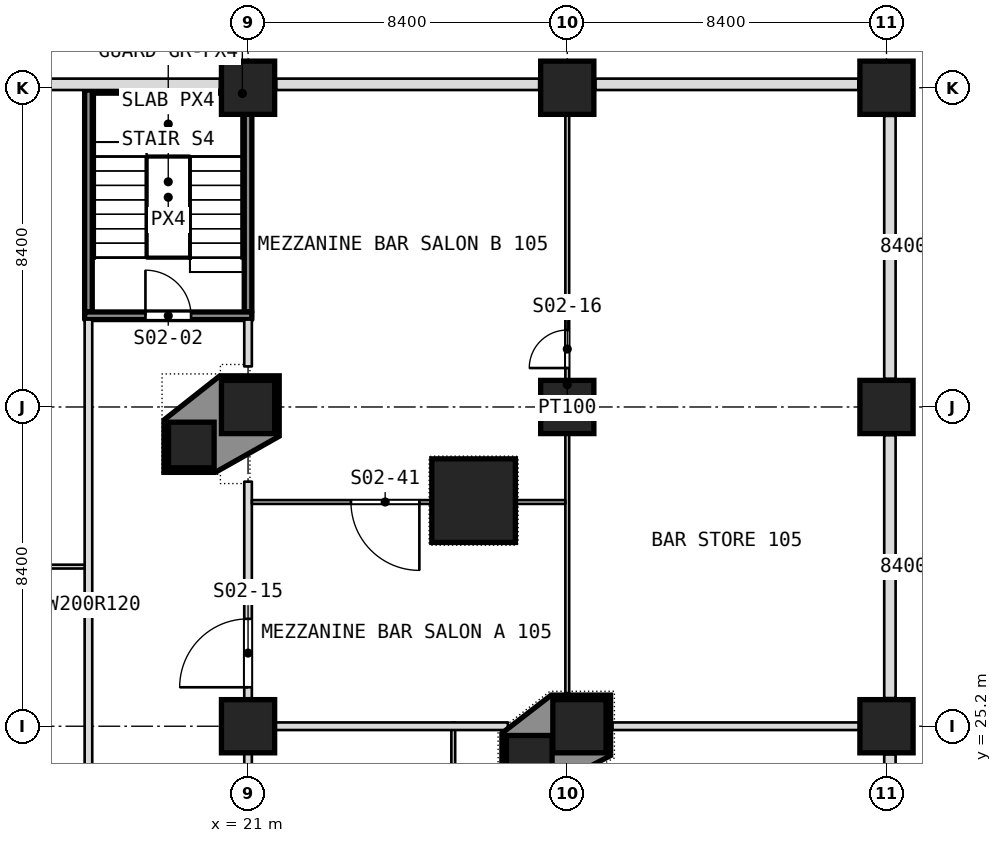
"""IFC4 building model, lengths in metres.
Left out: names, types, materials, properties, quantities, classifications, styles, units other than length and angle.
Written with IfcOpenShell. Run it as: python <this file> out.ifc"""

import sys

from ifc_helpers import new_model, si_unit, direction, frame, frame_2d, origin, origin_2d, place, context, subcontext, project, spatial, polyline, rectangle, outline, extrude, element, fill, save


model = new_model("IFC4")
c1 = context("Model", 3, precision=1e-05, world=origin(), true_north=direction((0.0, 1.0)))
c2 = subcontext(c1, "Body", "Model", "MODEL_VIEW")
j1 = project(units=[si_unit("LENGTHUNIT", "METRE"), si_unit("PLANEANGLEUNIT", "RADIAN")], contexts=[c1])
p1 = place(None, origin())
s1 = spatial("IfcSite", under=j1, at=p1, CompositionType="ELEMENT")
p2 = place(p1, origin())
s2 = spatial("IfcBuilding", under=s1, at=p2, CompositionType="ELEMENT")
p3 = place(p2, frame((0.0, 0.0, 8.0)))
s3 = spatial("IfcBuildingStorey", under=s2, at=p3, CompositionType="ELEMENT", Elevation=8.0)
for number, where, z_axis, x_axis in (
    (1, (21.0, 25.2, 0.0), (0.0, 0.0, 1.0), (1.0, 0.0, 0.0)),
    (2, (29.72, 25.2, 0.0), (0.0, 0.0, 1.0), (1.0, 0.0, 0.0)),
    (3, (37.8, 25.2, 0.0), (0.0, 0.0, 1.0), (1.0, 0.0, 0.0)),
    (4, (21.0, 33.6, 0.0), (0.0, 0.0, 1.0), (1.0, 0.0, 0.0)),
    (5, (29.4, 33.6, 0.0), (0.0, 0.0, 1.0), (1.0, 0.0, 0.0)),
    (6, (37.8, 33.6, 0.0), (0.0, 0.0, 1.0), (1.0, 0.0, 0.0)),
    (7, (21.0, 42.0, 0.0), (0.0, 0.0, 1.0), (1.0, 0.0, 0.0)),
    (8, (29.4, 42.0, 0.0), (0.0, 0.0, 1.0), (1.0, 0.0, 0.0)),
    (9, (37.8, 42.0, 0.0), (0.0, 0.0, 1.0), (1.0, 0.0, 0.0)),
):
    element("IfcColumn", number, at=place(p3, frame(where, z_axis=z_axis, x_axis=x_axis)), inside=s3, PredefinedType="COLUMN", context=c2, shape_type="SweptSolid", body=[
        extrude(rectangle(XDim=1.4, YDim=1.4, at=origin_2d()), origin(), (0.0, 0.0, 1.0), 5.0),
    ])
p4 = place(p3, frame((26.936, 31.135, 0.0), z_axis=(0.0, 0.0, 1.0), x_axis=(1.0, 0.0, 0.0)))
e10 = element("IfcColumn", 10, at=p4, inside=s3, PredefinedType="COLUMN", context=c2, shape_type="SweptSolid", body=[
    extrude(rectangle(XDim=2.2, YDim=2.2, at=origin_2d()), origin(), (0.0, 0.0, 1.0), 5.0),
])
for number, where, z_axis, x_axis in (
    (11, (19.507, 32.6, 0.0), (0.0, 0.0, 1.0), (1.0, 0.0, 0.0)),
    (12, (28.4, 24.356, 0.0), (0.0, 0.0, 1.0), (1.0, 0.0, 0.0)),
):
    element("IfcColumn", number, at=place(p3, frame(where, z_axis=z_axis, x_axis=x_axis)), inside=s3, PredefinedType="COLUMN", context=c2, shape_type="SweptSolid", body=[
        extrude(rectangle(XDim=1.2, YDim=1.2, at=origin_2d()), origin(), (0.0, 0.0, 1.0), 5.0),
    ])
p5 = place(p3, frame((29.4, 26.07, 0.0), z_axis=(0.0, 0.0, 1.0), x_axis=(0.0, 1.0, 0.0)))
e13 = element("IfcWall", 13, at=p5, inside=s3, PredefinedType="PARTITIONING", context=c2, shape_type="SweptSolid", body=[
    extrude(rectangle(XDim=16.23, YDim=0.1, at=frame_2d((8.115, 0.0))), origin(), (0.0, 0.0, 1.0), 4.68),
])
p6 = place(p5, frame((8.555, 0.0, 0.0)))
e14 = element("IfcOpeningElement", 14, at=p6, cuts=e13, PredefinedType="OPENING", context=c2, shape_type="SweptSolid", body=[
    extrude(rectangle(XDim=1.0, YDim=2.1, at=frame_2d((0.5, 1.05))), frame((0.0, 0.05, 0.0), z_axis=(0.0, -1.0, 0.0), x_axis=(1.0, 0.0, 0.0)), (0.0, 0.0, 1.0), 0.1),
])
p7 = place(p3, frame((26.4, 16.9, 0.0), z_axis=(0.0, 0.0, 1.0), x_axis=(0.0, 1.0, 0.0)))
e15 = element("IfcWall", 15, at=p7, inside=s3, PredefinedType="PARTITIONING", context=c2, shape_type="SweptSolid", body=[
    extrude(rectangle(XDim=8.4, YDim=0.1, at=frame_2d((4.2, 0.0))), origin(), (0.0, 0.0, 1.0), 4.68),
])
p8 = place(p7, frame((3.7, 0.0, 0.0)))
e16 = element("IfcOpeningElement", 16, at=p8, cuts=e15, PredefinedType="OPENING", context=c2, shape_type="SweptSolid", body=[
    extrude(rectangle(XDim=1.0, YDim=2.1, at=frame_2d((0.5, 1.05))), frame((0.0, 0.05, 0.0), z_axis=(0.0, -1.0, 0.0), x_axis=(1.0, 0.0, 0.0)), (0.0, 0.0, 1.0), 0.1),
])
p9 = place(p3, frame((21.0, 9.5, 0.0), z_axis=(0.0, 0.0, 1.0), x_axis=(0.0, 1.0, 0.0)))
e17 = element("IfcWall", 17, at=p9, inside=s3, PredefinedType="PARTITIONING", context=c2, shape_type="SweptSolid", body=[
    extrude(rectangle(XDim=22.135, YDim=0.2, at=frame_2d((11.067, 0.0))), origin(), (0.0, 0.0, 1.0), 4.68),
])
p10 = place(p9, frame((9.9, 0.0, 0.0)))
e18 = element("IfcOpeningElement", 18, at=p10, cuts=e17, PredefinedType="OPENING", context=c2, shape_type="SweptSolid", body=[
    extrude(rectangle(XDim=1.0, YDim=2.1, at=frame_2d((0.5, 1.05))), frame((0.0, 0.1, 0.0), z_axis=(0.0, -1.0, 0.0), x_axis=(1.0, 0.0, 0.0)), (0.0, 0.0, 1.0), 0.2),
])
p11 = place(p9, frame((16.725, 0.0, 0.0)))
e19 = element("IfcOpeningElement", 19, at=p11, cuts=e17, PredefinedType="OPENING", context=c2, shape_type="SweptSolid", body=[
    extrude(rectangle(XDim=1.8, YDim=2.1, at=frame_2d((0.9, 1.05))), frame((0.0, 0.1, 0.0), z_axis=(0.0, -1.0, 0.0), x_axis=(1.0, 0.0, 0.0)), (0.0, 0.0, 1.0), 0.2),
])
p12 = place(p3, frame((21.0, 34.668, 0.0), z_axis=(0.0, 0.0, 1.0), x_axis=(0.0, 1.0, 0.0)))
e20 = element("IfcWall", 20, at=p12, inside=s3, PredefinedType="PARTITIONING", context=c2, shape_type="SweptSolid", body=[
    extrude(rectangle(XDim=1.232, YDim=0.2, at=frame_2d((0.616, 0.0))), origin(), (0.0, 0.0, 1.0), 4.68),
])
p13 = place(p3, frame((21.0, 36.1, 0.0), z_axis=(0.0, 0.0, 1.0), x_axis=(0.0, 1.0, 0.0)))
e21 = element("IfcWall", 21, at=p13, inside=s3, PredefinedType="PARTITIONING", context=c2, shape_type="SweptSolid", body=[
    extrude(rectangle(XDim=6.2, YDim=0.2, at=frame_2d((3.1, 0.0))), origin(), (0.0, 0.0, 1.0), 4.68),
])
p14 = place(p3, frame((16.8, 20.9, 0.0), z_axis=(0.0, 0.0, 1.0), x_axis=(0.0, 1.0, 0.0)))
e22 = element("IfcWall", 22, at=p14, inside=s3, PredefinedType="PARTITIONING", context=c2, shape_type="SweptSolid", body=[
    extrude(rectangle(XDim=15.0, YDim=0.2, at=frame_2d((7.5, 0.0))), origin(), (0.0, 0.0, 1.0), 4.68),
])
p15 = place(p3, frame((16.8, 36.1, 0.0), z_axis=(0.0, 0.0, 1.0), x_axis=(0.0, 1.0, 0.0)))
e23 = element("IfcWall", 23, at=p15, inside=s3, PredefinedType="PARTITIONING", context=c2, shape_type="SweptSolid", body=[
    extrude(rectangle(XDim=5.84, YDim=0.2, at=frame_2d((2.92, 0.0))), origin(), (0.0, 0.0, 1.0), 4.68),
])
p16 = place(p3, frame((21.1, 25.2, 0.0), z_axis=(0.0, 0.0, 1.0), x_axis=(1.0, 0.0, 0.0)))
e24 = element("IfcWall", 24, at=p16, inside=s3, PredefinedType="PARTITIONING", context=c2, shape_type="SweptSolid", body=[
    extrude(rectangle(XDim=6.737, YDim=0.2, at=frame_2d((3.368, 0.0))), origin(), (0.0, 0.0, 1.0), 4.68),
])
p17 = place(p3, frame((30.59, 25.2, 0.0), z_axis=(0.0, 0.0, 1.0), x_axis=(1.0, 0.0, 0.0)))
e25 = element("IfcWall", 25, at=p17, inside=s3, PredefinedType="PARTITIONING", context=c2, shape_type="SweptSolid", body=[
    extrude(rectangle(XDim=7.51, YDim=0.2, at=frame_2d((3.755, 0.0))), origin(), (0.0, 0.0, 1.0), 4.68),
])
p18 = place(p3, frame((4.3, 29.4, 0.0), z_axis=(0.0, 0.0, 1.0), x_axis=(1.0, 0.0, 0.0)))
e26 = element("IfcWall", 26, at=p18, inside=s3, PredefinedType="PARTITIONING", context=c2, shape_type="SweptSolid", body=[
    extrude(rectangle(XDim=12.4, YDim=0.1, at=frame_2d((6.2, 0.0))), origin(), (0.0, 0.0, 1.0), 4.68),
])
p19 = place(p18, frame((5.6, 0.0, 0.0)))
e27 = element("IfcOpeningElement", 27, at=p19, cuts=e26, PredefinedType="OPENING", context=c2, shape_type="SweptSolid", body=[
    extrude(rectangle(XDim=1.2, YDim=2.1, at=frame_2d((0.6, 1.05))), frame((0.0, 0.05, 0.0), z_axis=(0.0, -1.0, 0.0), x_axis=(1.0, 0.0, 0.0)), (0.0, 0.0, 1.0), 0.1),
])
p20 = place(p3, frame((21.1, 31.1, 0.0), z_axis=(0.0, 0.0, 1.0), x_axis=(1.0, 0.0, 0.0)))
e28 = element("IfcWall", 28, at=p20, inside=s3, PredefinedType="PARTITIONING", context=c2, shape_type="SweptSolid", body=[
    extrude(rectangle(XDim=4.716, YDim=0.1, at=frame_2d((2.358, 0.0))), origin(), (0.0, 0.0, 1.0), 4.68),
])
p21 = place(p20, frame((2.608, 0.0, 0.0)))
e29 = element("IfcOpeningElement", 29, at=p21, cuts=e28, PredefinedType="OPENING", context=c2, shape_type="SweptSolid", body=[
    extrude(rectangle(XDim=1.8, YDim=2.1, at=frame_2d((0.9, 1.05))), frame((0.0, 0.05, 0.0), z_axis=(0.0, -1.0, 0.0), x_axis=(1.0, 0.0, 0.0)), (0.0, 0.0, 1.0), 0.1),
])
p22 = place(p3, frame((28.056, 31.1, 0.0), z_axis=(0.0, 0.0, 1.0), x_axis=(1.0, 0.0, 0.0)))
e30 = element("IfcWall", 30, at=p22, inside=s3, PredefinedType="PARTITIONING", context=c2, shape_type="SweptSolid", body=[
    extrude(rectangle(XDim=1.294, YDim=0.1, at=frame_2d((0.647, 0.0))), origin(), (0.0, 0.0, 1.0), 4.68),
])
p23 = place(p3, frame((16.7, 36.0, 0.0), z_axis=(0.0, 0.0, 1.0), x_axis=(1.0, 0.0, 0.0)))
e31 = element("IfcWall", 31, at=p23, inside=s3, PredefinedType="PARTITIONING", context=c2, shape_type="SweptSolid", body=[
    extrude(rectangle(XDim=4.4, YDim=0.2, at=frame_2d((2.2, 0.0))), origin(), (0.0, 0.0, 1.0), 4.68),
])
p24 = place(p23, frame((1.6, 0.0, 0.0)))
e32 = element("IfcOpeningElement", 32, at=p24, cuts=e31, PredefinedType="OPENING", context=c2, shape_type="SweptSolid", body=[
    extrude(rectangle(XDim=1.2, YDim=2.1, at=frame_2d((0.6, 1.05))), frame((0.0, 0.1, 0.0), z_axis=(0.0, -1.0, 0.0), x_axis=(1.0, 0.0, 0.0)), (0.0, 0.0, 1.0), 0.2),
])
p25 = place(p3, frame((37.89, 17.54, 0.0), z_axis=(0.0, 0.0, 1.0), x_axis=(0.0, 1.0, 0.0)))
e33 = element("IfcWall", 33, at=p25, inside=s3, PredefinedType="NOTDEFINED", context=c2, shape_type="SweptSolid", body=[
    extrude(rectangle(XDim=6.92, YDim=0.3, at=frame_2d((3.46, 0.0))), origin(), (0.0, 0.0, 1.0), 3.78),
])
p26 = place(p3, frame((37.89, 25.94, 0.0), z_axis=(0.0, 0.0, 1.0), x_axis=(0.0, 1.0, 0.0)))
e34 = element("IfcWall", 34, at=p26, inside=s3, PredefinedType="NOTDEFINED", context=c2, shape_type="SweptSolid", body=[
    extrude(rectangle(XDim=6.92, YDim=0.3, at=frame_2d((3.46, 0.0))), origin(), (0.0, 0.0, 1.0), 3.78),
])
p27 = place(p3, frame((37.89, 34.34, 0.0), z_axis=(0.0, 0.0, 1.0), x_axis=(0.0, 1.0, 0.0)))
e35 = element("IfcWall", 35, at=p27, inside=s3, PredefinedType="NOTDEFINED", context=c2, shape_type="SweptSolid", body=[
    extrude(rectangle(XDim=6.92, YDim=0.3, at=frame_2d((3.46, 0.0))), origin(), (0.0, 0.0, 1.0), 3.78),
])
p28 = place(p3, frame((37.06, 42.09, 0.0), z_axis=(0.0, 0.0, 1.0), x_axis=(-1.0, 0.0, 0.0)))
e36 = element("IfcWall", 36, at=p28, inside=s3, PredefinedType="NOTDEFINED", context=c2, shape_type="SweptSolid", body=[
    extrude(rectangle(XDim=6.92, YDim=0.3, at=frame_2d((3.46, 0.0))), origin(), (0.0, 0.0, 1.0), 3.78),
])
for number, where, z_axis, x_axis in (
    (37, (28.66, 42.09, 0.0), (0.0, 0.0, 1.0), (-1.0, 0.0, 0.0)),
    (38, (20.26, 42.09, 0.0), (0.0, 0.0, 1.0), (-1.0, 0.0, 0.0)),
):
    element("IfcWall", number, at=place(p3, frame(where, z_axis=z_axis, x_axis=x_axis)), inside=s3, PredefinedType="NOTDEFINED", context=c2, shape_type="SweptSolid", body=[
        extrude(rectangle(XDim=6.92, YDim=0.3, at=frame_2d((3.46, 0.0))), origin(), (0.0, 0.0, 1.0), 3.78),
    ])
p29 = place(p3, origin())
e39 = element("IfcWall", 39, at=p29, inside=s3, PredefinedType="SOLIDWALL", context=c2, shape_type="SweptSolid", body=[
    extrude(outline(polyline([(20.258, 34.42), (21.82, 34.42), (21.82, 32.83), (20.138, 31.88), (18.787, 31.88), (18.787, 33.258), (20.258, 34.42)]), holes=[polyline([(21.7, 32.9), (21.7, 34.3), (20.3, 34.3), (20.3, 32.9), (21.7, 32.9)]), polyline([(20.107, 32.0), (20.107, 33.2), (18.907, 33.2), (18.907, 32.0), (20.107, 32.0)])]), origin(), (0.0, 0.0, 1.0), 5.0),
])
p30 = place(p3, origin())
e40 = element("IfcWall", 40, at=p30, inside=s3, PredefinedType="SOLIDWALL", context=c2, shape_type="SweptSolid", body=[
    extrude(outline(polyline([(27.68, 25.015), (28.979, 26.02), (30.54, 26.02), (30.54, 24.427), (29.03, 23.636), (27.68, 23.636), (27.68, 25.015)]), holes=[polyline([(29.02, 24.5), (30.42, 24.5), (30.42, 25.9), (29.02, 25.9), (29.02, 24.5)]), polyline([(27.8, 23.756), (29.0, 23.756), (29.0, 24.956), (27.8, 24.956), (27.8, 23.756)])]), origin(), (0.0, 0.0, 1.0), 5.0),
])
p31 = place(p6, origin())
e41 = element("IfcDoor", 41, at=p31, inside=s3, OperationType="SINGLE_SWING_RIGHT", PredefinedType="DOOR", context=c2, shape_type="SweptSolid", body=[
    extrude(rectangle(XDim=1.0, YDim=2.1, at=frame_2d((0.5, 1.05))), frame((0.0, 0.025, 0.0), z_axis=(0.0, -1.0, 0.0), x_axis=(1.0, 0.0, 0.0)), (0.0, 0.0, 1.0), 0.05),
])
fill(e14, e41)
p32 = place(p11, origin())
e42 = element("IfcDoor", 42, at=p32, inside=s3, OperationType="DOUBLE_DOOR_SINGLE_SWING", PredefinedType="DOOR", context=c2, shape_type="SweptSolid", body=[
    extrude(rectangle(XDim=1.8, YDim=2.1, at=frame_2d((0.9, 1.05))), frame((0.0, 0.025, 0.0), z_axis=(0.0, -1.0, 0.0), x_axis=(1.0, 0.0, 0.0)), (0.0, 0.0, 1.0), 0.05),
])
fill(e19, e42)
p33 = place(p21, origin())
e43 = element("IfcDoor", 43, at=p33, inside=s3, OperationType="DOUBLE_DOOR_SINGLE_SWING", PredefinedType="DOOR", context=c2, shape_type="SweptSolid", body=[
    extrude(rectangle(XDim=1.8, YDim=2.1, at=frame_2d((0.9, 1.05))), frame((0.0, 0.025, 0.0), z_axis=(0.0, -1.0, 0.0), x_axis=(1.0, 0.0, 0.0)), (0.0, 0.0, 1.0), 0.05),
])
fill(e29, e43)
p34 = place(p24, origin())
e44 = element("IfcDoor", 44, at=p34, inside=s3, OperationType="SINGLE_SWING_LEFT", PredefinedType="DOOR", context=c2, shape_type="SweptSolid", body=[
    extrude(rectangle(XDim=1.2, YDim=2.1, at=frame_2d((0.6, 1.05))), frame((0.0, 0.025, 0.0), z_axis=(0.0, -1.0, 0.0), x_axis=(1.0, 0.0, 0.0)), (0.0, 0.0, 1.0), 0.05),
])
fill(e32, e44)
save(model, sys.argv[1])
